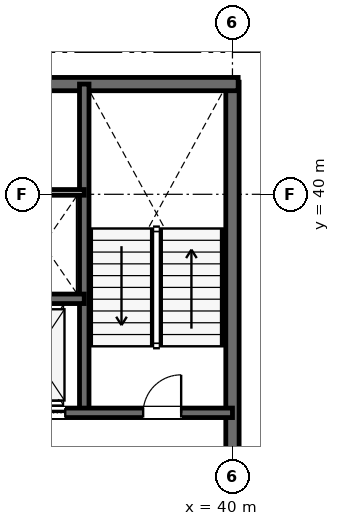
"""IFC4 building model, lengths in metres.
Left out: names, types, materials, properties, quantities, classifications, styles, units other than length and angle.
Written with IfcOpenShell. Run it as: python <this file> out.ifc"""

import sys

from ifc_helpers import new_model, si_unit, direction, frame, frame_2d, origin, place, context, subcontext, project, spatial, rectangle, extrude, element, fill, save


model = new_model("IFC4")
c1 = context("Model", 3, precision=1e-05, world=origin(), true_north=direction((0.0, 1.0)))
c2 = subcontext(c1, "Body", "Model", "MODEL_VIEW")
j1 = project(units=[si_unit("LENGTHUNIT", "METRE"), si_unit("PLANEANGLEUNIT", "RADIAN")], contexts=[c1])
p1 = place(None, origin())
s1 = spatial("IfcSite", under=j1, at=p1, CompositionType="ELEMENT")
p2 = place(p1, origin())
s2 = spatial("IfcBuilding", under=s1, at=p2, CompositionType="ELEMENT")
p3 = place(p2, frame((0.0, 0.0, 97.2)))
s3 = spatial("IfcBuildingStorey", under=s2, at=p3, CompositionType="ELEMENT", Elevation=97.2)
p4 = place(p3, frame((40.0, 30.65, 0.0), z_axis=(0.0, 0.0, 1.0), x_axis=(0.0, 1.0, 0.0)))
e1 = element("IfcWall", 1, at=p4, inside=s3, PredefinedType="SHEAR", context=c2, shape_type="SweptSolid", body=[
    extrude(rectangle(XDim=12.3, YDim=0.35, at=frame_2d((6.15, 0.0))), origin(), (0.0, 0.0, 1.0), 3.6),
])
p5 = place(p3, frame((15.85, 42.9, 0.0), z_axis=(0.0, 0.0, 1.0), x_axis=(1.0, 0.0, 0.0)))
e2 = element("IfcWall", 2, at=p5, inside=s3, PredefinedType="SHEAR", context=c2, shape_type="SweptSolid", body=[
    extrude(rectangle(XDim=24.3, YDim=0.35, at=frame_2d((12.15, 0.0))), origin(), (0.0, 0.0, 1.0), 3.6),
])
p6 = place(p3, frame((36.1, 34.25, 0.0), z_axis=(0.0, 0.0, 1.0), x_axis=(0.0, 1.0, 0.0)))
e3 = element("IfcWall", 3, at=p6, inside=s3, PredefinedType="SHEAR", context=c2, shape_type="SweptSolid", body=[
    extrude(rectangle(XDim=8.65, YDim=0.25, at=frame_2d((4.325, 0.0))), origin(), (0.0, 0.0, 1.0), 3.6),
])
p7 = place(p3, frame((33.95, 34.25, 0.0), z_axis=(0.0, 0.0, 1.0), x_axis=(1.0, 0.0, 0.0)))
e4 = element("IfcWall", 4, at=p7, inside=s3, PredefinedType="SHEAR", context=c2, shape_type="SweptSolid", body=[
    extrude(rectangle(XDim=6.05, YDim=0.25, at=frame_2d((3.025, 0.0))), origin(), (0.0, 0.0, 1.0), 3.6),
])
p8 = place(p7, frame((3.7, 0.0, 0.0)))
e5 = element("IfcOpeningElement", 5, at=p8, cuts=e4, PredefinedType="OPENING", context=c2, shape_type="SweptSolid", body=[
    extrude(rectangle(XDim=1.0, YDim=2.15, at=frame_2d((0.5, 1.075))), frame((0.0, 0.135, 0.0), z_axis=(0.0, -1.0, 0.0), x_axis=(1.0, 0.0, 0.0)), (0.0, 0.0, 1.0), 0.27),
])
p9 = place(p7, frame((0.55, 0.0, 0.0)))
e6 = element("IfcOpeningElement", 6, at=p9, cuts=e4, PredefinedType="OPENING", context=c2, shape_type="SweptSolid", body=[
    extrude(rectangle(XDim=1.1, YDim=2.15, at=frame_2d((0.55, 1.075))), frame((0.0, 0.135, 0.0), z_axis=(0.0, -1.0, 0.0), x_axis=(1.0, 0.0, 0.0)), (0.0, 0.0, 1.0), 0.27),
])
p10 = place(p3, frame((19.9, 37.25, 0.0), z_axis=(0.0, 0.0, 1.0), x_axis=(1.0, 0.0, 0.0)))
e7 = element("IfcWall", 7, at=p10, inside=s3, PredefinedType="SHEAR", context=c2, shape_type="SweptSolid", body=[
    extrude(rectangle(XDim=16.2, YDim=0.25, at=frame_2d((8.1, 0.0))), origin(), (0.0, 0.0, 1.0), 3.6),
])
p11 = place(p10, frame((12.55, 0.0, 0.0)))
e8 = element("IfcOpeningElement", 8, at=p11, cuts=e7, PredefinedType="OPENING", context=c2, shape_type="SweptSolid", body=[
    extrude(rectangle(XDim=0.9, YDim=2.15, at=frame_2d((0.45, 1.075))), frame((0.0, 0.135, 0.0), z_axis=(0.0, -1.0, 0.0), x_axis=(1.0, 0.0, 0.0)), (0.0, 0.0, 1.0), 0.27),
])
p12 = place(p3, frame((34.05, 40.05, 0.0), z_axis=(0.0, 0.0, 1.0), x_axis=(1.0, 0.0, 0.0)))
e9 = element("IfcWall", 9, at=p12, inside=s3, PredefinedType="PARTITIONING", context=c2, shape_type="SweptSolid", body=[
    extrude(rectangle(XDim=2.05, YDim=0.15, at=frame_2d((1.025, 0.0))), origin(), (0.0, 0.0, 1.0), 3.33),
])
p13 = place(p8, origin())
e10 = element("IfcDoor", 10, at=p13, inside=s3, OperationType="SINGLE_SWING_RIGHT", PredefinedType="DOOR", context=c2, shape_type="SweptSolid", body=[
    extrude(rectangle(XDim=1.0, YDim=2.15, at=frame_2d((0.5, 1.075))), frame((0.0, 0.025, 0.0), z_axis=(0.0, -1.0, 0.0), x_axis=(1.0, 0.0, 0.0)), (0.0, 0.0, 1.0), 0.05),
])
fill(e5, e10)
p14 = place(p9, origin())
e11 = element("IfcDoor", 11, at=p14, inside=s3, OperationType="DOUBLE_DOOR_SLIDING", PredefinedType="DOOR", context=c2, shape_type="SweptSolid", body=[
    extrude(rectangle(XDim=1.1, YDim=2.15, at=frame_2d((0.55, 1.075))), frame((0.0, 0.025, 0.0), z_axis=(0.0, -1.0, 0.0), x_axis=(1.0, 0.0, 0.0)), (0.0, 0.0, 1.0), 0.05),
])
fill(e6, e11)
save(model, sys.argv[1])
